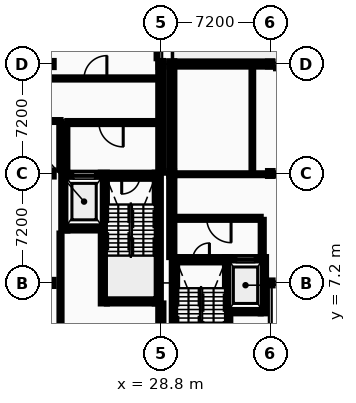
"""IFC4 building model, lengths in metres.
Left out: names, types, materials, properties, quantities, classifications, styles, units other than length and angle.
Written with IfcOpenShell. Run it as: python <this file> out.ifc"""

import sys

from ifc_helpers import new_model, si_unit, direction, frame, frame_2d, origin, origin_2d, place, context, subcontext, project, spatial, rectangle, i_section, extrude, element, fill, save


model = new_model("IFC4")
c1 = context("Model", 3, precision=1e-05, world=origin(), true_north=direction((0.0, 1.0)))
c2 = subcontext(c1, "Body", "Model", "MODEL_VIEW")
j1 = project(units=[si_unit("LENGTHUNIT", "METRE"), si_unit("PLANEANGLEUNIT", "RADIAN")], contexts=[c1])
p1 = place(None, origin())
s1 = spatial("IfcSite", under=j1, at=p1, CompositionType="ELEMENT")
p2 = place(p1, origin())
s2 = spatial("IfcBuilding", under=s1, at=p2, CompositionType="ELEMENT")
p3 = place(p2, frame((0.0, 0.0, 14.0)))
s3 = spatial("IfcBuildingStorey", under=s2, at=p3, CompositionType="ELEMENT", Elevation=14.0)
for number, where, z_axis, x_axis in (
    (1, (21.6, 7.2, 0.0), (0.0, 0.0, 1.0), (1.0, 0.0, 0.0)),
    (2, (21.6, 14.4, 0.0), (0.0, 0.0, 1.0), (1.0, 0.0, 0.0)),
    (3, (21.6, 21.6, 0.0), (0.0, 0.0, 1.0), (1.0, 0.0, 0.0)),
    (4, (28.8, 21.6, 0.0), (0.0, 0.0, 1.0), (1.0, 0.0, 0.0)),
):
    element("IfcColumn", number, at=place(p3, frame(where, z_axis=z_axis, x_axis=x_axis)), inside=s3, PredefinedType="COLUMN", context=c2, shape_type="SweptSolid", body=[
        extrude(i_section(OverallWidth=0.3, OverallDepth=0.4, WebThickness=0.013, FlangeThickness=0.024, FilletRadius=0.027, at=origin_2d()), origin(), (0.0, 0.0, 1.0), 4.4),
    ])
for number, where, z_axis, x_axis in (
    (5, (29.52, 14.4, 0.0), (0.0, 0.0, 1.0), (1.0, 0.0, 0.0)),
    (6, (29.52, 21.6, 0.0), (0.0, 0.0, 1.0), (1.0, 0.0, 0.0)),
    (7, (36.0, 7.2, 0.0), (0.0, 0.0, 1.0), (1.0, 0.0, 0.0)),
    (8, (36.0, 14.4, 0.0), (0.0, 0.0, 1.0), (1.0, 0.0, 0.0)),
    (9, (36.0, 21.6, 0.0), (0.0, 0.0, 1.0), (1.0, 0.0, 0.0)),
):
    element("IfcColumn", number, at=place(p3, frame(where, z_axis=z_axis, x_axis=x_axis)), inside=s3, PredefinedType="COLUMN", context=c2, shape_type="SweptSolid", body=[
        extrude(i_section(OverallWidth=0.3, OverallDepth=0.32, WebThickness=0.011, FlangeThickness=0.021, FilletRadius=0.027, at=origin_2d()), origin(), (0.0, 0.0, 1.0), 4.4),
    ])
p4 = place(p3, frame((28.8, -0.17, 0.0), z_axis=(0.0, 0.0, 1.0), x_axis=(0.0, 1.0, 0.0)))
e10 = element("IfcWall", 10, at=p4, inside=s3, PredefinedType="STANDARD", context=c2, shape_type="SweptSolid", body=[
    extrude(rectangle(XDim=6.02, YDim=0.34, at=frame_2d((3.01, 0.0))), origin(), (0.0, 0.0, 1.0), 4.2),
])
p5 = place(p4, frame((2.478, 0.0, 0.95)))
e11 = element("IfcOpeningElement", 11, at=p5, cuts=e10, PredefinedType="OPENING", context=c2, shape_type="SweptSolid", body=[
    extrude(rectangle(XDim=1.064, YDim=1.368, at=frame_2d((0.532, 0.684))), frame((0.0, 0.18, 0.0), z_axis=(0.0, -1.0, 0.0), x_axis=(1.0, 0.0, 0.0)), (0.0, 0.0, 1.0), 0.36),
])
p6 = place(p3, frame((28.8, 14.45, 0.0), z_axis=(0.0, 0.0, 1.0), x_axis=(0.0, 1.0, 0.0)))
e12 = element("IfcWall", 12, at=p6, inside=s3, PredefinedType="STANDARD", context=c2, shape_type="SweptSolid", body=[
    extrude(rectangle(XDim=7.15, YDim=0.34, at=frame_2d((3.575, 0.0))), origin(), (0.0, 0.0, 1.0), 4.2),
])
p7 = place(p6, frame((1.596, 0.0, 0.95)))
e13 = element("IfcOpeningElement", 13, at=p7, cuts=e12, PredefinedType="OPENING", context=c2, shape_type="SweptSolid", body=[
    extrude(rectangle(XDim=1.098, YDim=1.368, at=frame_2d((0.549, 0.684))), frame((0.0, 0.18, 0.0), z_axis=(0.0, -1.0, 0.0), x_axis=(1.0, 0.0, 0.0)), (0.0, 0.0, 1.0), 0.36),
])
p8 = place(p6, frame((4.456, 0.0, 0.95)))
e14 = element("IfcOpeningElement", 14, at=p8, cuts=e12, PredefinedType="OPENING", context=c2, shape_type="SweptSolid", body=[
    extrude(rectangle(XDim=1.098, YDim=1.368, at=frame_2d((0.549, 0.684))), frame((0.0, 0.18, 0.0), z_axis=(0.0, -1.0, 0.0), x_axis=(1.0, 0.0, 0.0)), (0.0, 0.0, 1.0), 0.36),
])
p9 = place(p3, frame((36.11, 21.6, 0.0), z_axis=(0.0, 0.0, 1.0), x_axis=(-1.0, 0.0, 0.0)))
e15 = element("IfcWall", 15, at=p9, inside=s3, PredefinedType="STANDARD", context=c2, shape_type="SweptSolid", body=[
    extrude(rectangle(XDim=6.42, YDim=0.34, at=frame_2d((3.21, 0.0))), origin(), (0.0, 0.0, 1.0), 3.935),
])
p10 = place(p3, frame((29.52, 14.4, 0.0), z_axis=(0.0, 0.0, 1.0), x_axis=(0.0, -1.0, 0.0)))
e16 = element("IfcWall", 16, at=p10, inside=s3, PredefinedType="STANDARD", context=c2, shape_type="SweptSolid", body=[
    extrude(rectangle(XDim=5.5, YDim=0.34, at=frame_2d((2.75, 0.0))), origin(), (0.0, 0.0, 1.0), 4.2),
])
p11 = place(p3, frame((29.52, 21.77, 0.0), z_axis=(0.0, 0.0, 1.0), x_axis=(0.0, -1.0, 0.0)))
e17 = element("IfcWall", 17, at=p11, inside=s3, PredefinedType="STANDARD", context=c2, shape_type="SweptSolid", body=[
    extrude(rectangle(XDim=7.37, YDim=0.34, at=frame_2d((3.685, 0.0))), origin(), (0.0, 0.0, 1.0), 3.895),
])
p12 = place(p11, frame((1.73, 0.0, 0.95)))
e18 = element("IfcOpeningElement", 18, at=p12, cuts=e17, PredefinedType="OPENING", context=c2, shape_type="SweptSolid", body=[
    extrude(rectangle(XDim=0.962, YDim=1.404, at=frame_2d((0.481, 0.702))), frame((0.0, 0.18, 0.0), z_axis=(0.0, -1.0, 0.0), x_axis=(1.0, 0.0, 0.0)), (0.0, 0.0, 1.0), 0.36),
])
p13 = place(p11, frame((4.678, 0.0, 0.95)))
e19 = element("IfcOpeningElement", 19, at=p13, cuts=e17, PredefinedType="OPENING", context=c2, shape_type="SweptSolid", body=[
    extrude(rectangle(XDim=0.962, YDim=1.404, at=frame_2d((0.481, 0.702))), frame((0.0, 0.18, 0.0), z_axis=(0.0, -1.0, 0.0), x_axis=(1.0, 0.0, 0.0)), (0.0, 0.0, 1.0), 0.36),
])
p14 = place(p3, frame((25.25, 6.05, 0.0), z_axis=(0.0, 0.0, 1.0), x_axis=(1.0, 0.0, 0.0)))
e20 = element("IfcWall", 20, at=p14, inside=s3, PredefinedType="SHEAR", context=c2, shape_type="SweptSolid", body=[
    extrude(rectangle(XDim=3.15, YDim=0.4, at=frame_2d((1.575, 0.0))), origin(), (0.0, 0.0, 1.0), 4.2),
])
p15 = place(p3, frame((25.25, 14.25, 0.0), z_axis=(0.0, 0.0, 1.0), x_axis=(1.0, 0.0, 0.0)))
e21 = element("IfcWall", 21, at=p15, inside=s3, PredefinedType="SHEAR", context=c2, shape_type="SweptSolid", body=[
    extrude(rectangle(XDim=3.15, YDim=0.4, at=frame_2d((1.575, 0.0))), origin(), (0.0, 0.0, 1.0), 4.2),
])
p16 = place(p15, frame((0.975, 0.0, 0.0)))
e22 = element("IfcOpeningElement", 22, at=p16, cuts=e21, PredefinedType="OPENING", context=c2, shape_type="SweptSolid", body=[
    extrude(rectangle(XDim=1.2, YDim=2.15, at=frame_2d((0.6, 1.075))), frame((0.0, 0.21, 0.0), z_axis=(0.0, -1.0, 0.0), x_axis=(1.0, 0.0, 0.0)), (0.0, 0.0, 1.0), 0.42),
])
for number, where, z_axis, x_axis in (
    (23, (25.05, 5.85, 0.0), (0.0, 0.0, 1.0), (0.0, 1.0, 0.0)),
    (24, (28.6, 5.85, 0.0), (0.0, 0.0, 1.0), (0.0, 1.0, 0.0)),
):
    element("IfcWall", number, at=place(p3, frame(where, z_axis=z_axis, x_axis=x_axis)), inside=s3, PredefinedType="SHEAR", context=c2, shape_type="SweptSolid", body=[
        extrude(rectangle(XDim=8.6, YDim=0.4, at=frame_2d((4.3, 0.0))), origin(), (0.0, 0.0, 1.0), 4.2),
    ])
p17 = place(p3, frame((22.65, 10.85, 0.0), z_axis=(0.0, 0.0, 1.0), x_axis=(1.0, 0.0, 0.0)))
e25 = element("IfcWall", 25, at=p17, inside=s3, PredefinedType="SHEAR", context=c2, shape_type="SweptSolid", body=[
    extrude(rectangle(XDim=2.2, YDim=0.4, at=frame_2d((1.1, 0.0))), origin(), (0.0, 0.0, 1.0), 4.2),
])
p18 = place(p3, frame((22.65, 14.25, 0.0), z_axis=(0.0, 0.0, 1.0), x_axis=(1.0, 0.0, 0.0)))
e26 = element("IfcWall", 26, at=p18, inside=s3, PredefinedType="SHEAR", context=c2, shape_type="SweptSolid", body=[
    extrude(rectangle(XDim=2.2, YDim=0.4, at=frame_2d((1.1, 0.0))), origin(), (0.0, 0.0, 1.0), 4.2),
])
p19 = place(p18, frame((0.4, 0.0, 0.0)))
e27 = element("IfcOpeningElement", 27, at=p19, cuts=e26, PredefinedType="OPENING", context=c2, shape_type="SweptSolid", body=[
    extrude(rectangle(XDim=1.4, YDim=2.2, at=frame_2d((0.7, 1.1))), frame((0.0, 0.21, 0.0), z_axis=(0.0, -1.0, 0.0), x_axis=(1.0, 0.0, 0.0)), (0.0, 0.0, 1.0), 0.42),
])
p20 = place(p3, frame((22.45, 10.65, 0.0), z_axis=(0.0, 0.0, 1.0), x_axis=(0.0, 1.0, 0.0)))
e28 = element("IfcWall", 28, at=p20, inside=s3, PredefinedType="SHEAR", context=c2, shape_type="SweptSolid", body=[
    extrude(rectangle(XDim=3.8, YDim=0.4, at=frame_2d((1.9, 0.0))), origin(), (0.0, 0.0, 1.0), 4.2),
])
p21 = place(p3, frame((22.65, 17.75, 0.0), z_axis=(0.0, 0.0, 1.0), x_axis=(1.0, 0.0, 0.0)))
e29 = element("IfcWall", 29, at=p21, inside=s3, PredefinedType="PARTITIONING", context=c2, shape_type="SweptSolid", body=[
    extrude(rectangle(XDim=5.75, YDim=0.2, at=frame_2d((2.875, 0.0))), origin(), (0.0, 0.0, 1.0), 4.2),
])
p22 = place(p21, frame((2.075, 0.0, 0.0)))
e30 = element("IfcOpeningElement", 30, at=p22, cuts=e29, PredefinedType="OPENING", context=c2, shape_type="SweptSolid", body=[
    extrude(rectangle(XDim=1.6, YDim=2.2, at=frame_2d((0.8, 1.1))), frame((0.0, 0.11, 0.0), z_axis=(0.0, -1.0, 0.0), x_axis=(1.0, 0.0, 0.0)), (0.0, 0.0, 1.0), 0.22),
])
p23 = place(p3, frame((22.55, 14.45, 0.0), z_axis=(0.0, 0.0, 1.0), x_axis=(0.0, 1.0, 0.0)))
e31 = element("IfcWall", 31, at=p23, inside=s3, PredefinedType="PARTITIONING", context=c2, shape_type="SweptSolid", body=[
    extrude(rectangle(XDim=3.2, YDim=0.2, at=frame_2d((1.6, 0.0))), origin(), (0.0, 0.0, 1.0), 4.2),
])
p24 = place(p3, frame((29.87, 8.725, 0.0), z_axis=(0.0, 0.0, 1.0), x_axis=(1.0, 0.0, 0.0)))
e32 = element("IfcWall", 32, at=p24, inside=s3, PredefinedType="SHEAR", context=c2, shape_type="SweptSolid", body=[
    extrude(rectangle(XDim=3.15, YDim=0.35, at=frame_2d((1.575, 0.0))), origin(), (0.0, 0.0, 1.0), 4.2),
])
p25 = place(p24, frame((1.025, 0.0, 0.0)))
e33 = element("IfcOpeningElement", 33, at=p25, cuts=e32, PredefinedType="OPENING", context=c2, shape_type="SweptSolid", body=[
    extrude(rectangle(XDim=1.1, YDim=2.15, at=frame_2d((0.55, 1.075))), frame((0.0, 0.185, 0.0), z_axis=(0.0, -1.0, 0.0), x_axis=(1.0, 0.0, 0.0)), (0.0, 0.0, 1.0), 0.37),
])
for number, where, z_axis, x_axis in (
    (34, (29.695, 0.4, 0.0), (0.0, 0.0, 1.0), (0.0, 1.0, 0.0)),
    (35, (33.195, 0.4, 0.0), (0.0, 0.0, 1.0), (0.0, 1.0, 0.0)),
):
    element("IfcWall", number, at=place(p3, frame(where, z_axis=z_axis, x_axis=x_axis)), inside=s3, PredefinedType="SHEAR", context=c2, shape_type="SweptSolid", body=[
        extrude(rectangle(XDim=8.5, YDim=0.35, at=frame_2d((4.25, 0.0))), origin(), (0.0, 0.0, 1.0), 4.2),
    ])
p26 = place(p3, frame((33.37, 5.375, 0.0), z_axis=(0.0, 0.0, 1.0), x_axis=(1.0, 0.0, 0.0)))
e36 = element("IfcWall", 36, at=p26, inside=s3, PredefinedType="SHEAR", context=c2, shape_type="SweptSolid", body=[
    extrude(rectangle(XDim=2.0, YDim=0.35, at=frame_2d((1.0, 0.0))), origin(), (0.0, 0.0, 1.0), 4.2),
])
p27 = place(p3, frame((33.37, 8.725, 0.0), z_axis=(0.0, 0.0, 1.0), x_axis=(1.0, 0.0, 0.0)))
e37 = element("IfcWall", 37, at=p27, inside=s3, PredefinedType="SHEAR", context=c2, shape_type="SweptSolid", body=[
    extrude(rectangle(XDim=2.0, YDim=0.35, at=frame_2d((1.0, 0.0))), origin(), (0.0, 0.0, 1.0), 4.2),
])
p28 = place(p27, frame((0.4, 0.0, 0.0)))
e38 = element("IfcOpeningElement", 38, at=p28, cuts=e37, PredefinedType="OPENING", context=c2, shape_type="SweptSolid", body=[
    extrude(rectangle(XDim=1.2, YDim=2.2, at=frame_2d((0.6, 1.1))), frame((0.0, 0.185, 0.0), z_axis=(0.0, -1.0, 0.0), x_axis=(1.0, 0.0, 0.0)), (0.0, 0.0, 1.0), 0.37),
])
p29 = place(p3, frame((35.545, 5.2, 0.0), z_axis=(0.0, 0.0, 1.0), x_axis=(0.0, 1.0, 0.0)))
e39 = element("IfcWall", 39, at=p29, inside=s3, PredefinedType="SHEAR", context=c2, shape_type="SweptSolid", body=[
    extrude(rectangle(XDim=3.7, YDim=0.35, at=frame_2d((1.85, 0.0))), origin(), (0.0, 0.0, 1.0), 4.2),
])
p30 = place(p3, frame((29.87, 11.45, 0.0), z_axis=(0.0, 0.0, 1.0), x_axis=(1.0, 0.0, 0.0)))
e40 = element("IfcWall", 40, at=p30, inside=s3, PredefinedType="PARTITIONING", context=c2, shape_type="SweptSolid", body=[
    extrude(rectangle(XDim=5.5, YDim=0.2, at=frame_2d((2.75, 0.0))), origin(), (0.0, 0.0, 1.0), 4.2),
])
p31 = place(p30, frame((1.95, 0.0, 0.0)))
e41 = element("IfcOpeningElement", 41, at=p31, cuts=e40, PredefinedType="OPENING", context=c2, shape_type="SweptSolid", body=[
    extrude(rectangle(XDim=1.6, YDim=2.2, at=frame_2d((0.8, 1.1))), frame((0.0, 0.11, 0.0), z_axis=(0.0, -1.0, 0.0), x_axis=(1.0, 0.0, 0.0)), (0.0, 0.0, 1.0), 0.22),
])
p32 = place(p3, frame((35.47, 8.9, 0.0), z_axis=(0.0, 0.0, 1.0), x_axis=(0.0, 1.0, 0.0)))
e42 = element("IfcWall", 42, at=p32, inside=s3, PredefinedType="PARTITIONING", context=c2, shape_type="SweptSolid", body=[
    extrude(rectangle(XDim=2.45, YDim=0.2, at=frame_2d((1.225, 0.0))), origin(), (0.0, 0.0, 1.0), 4.2),
])
p33 = place(p3, frame((29.9, 14.35, 0.0), z_axis=(0.0, 0.0, 1.0), x_axis=(1.0, 0.0, 0.0)))
e43 = element("IfcWall", 43, at=p33, inside=s3, PredefinedType="PARTITIONING", context=c2, shape_type="SweptSolid", body=[
    extrude(rectangle(XDim=5.72, YDim=0.125, at=frame_2d((2.86, 0.0))), origin(), (0.0, 0.0, 1.0), 3.935),
])
p34 = place(p33, frame((1.96, 0.0, 0.0)))
e44 = element("IfcOpeningElement", 44, at=p34, cuts=e43, PredefinedType="OPENING", context=c2, shape_type="SweptSolid", body=[
    extrude(rectangle(XDim=1.0, YDim=2.1, at=frame_2d((0.5, 1.05))), frame((0.0, 0.073, 0.0), z_axis=(0.0, -1.0, 0.0), x_axis=(1.0, 0.0, 0.0)), (0.0, 0.0, 1.0), 0.145),
])
p35 = place(p3, frame((9.45, 17.85, 0.0), z_axis=(0.0, 0.0, 1.0), x_axis=(1.0, 0.0, 0.0)))
e45 = element("IfcWall", 45, at=p35, inside=s3, PredefinedType="PARTITIONING", context=c2, shape_type="SweptSolid", body=[
    extrude(rectangle(XDim=12.75, YDim=0.125, at=frame_2d((6.375, 0.0))), origin(), (0.0, 0.0, 1.0), 4.2),
])
p36 = place(p35, frame((1.225, 0.0, 0.0)))
e46 = element("IfcOpeningElement", 46, at=p36, cuts=e45, PredefinedType="OPENING", context=c2, shape_type="SweptSolid", body=[
    extrude(rectangle(XDim=1.0, YDim=2.1, at=frame_2d((0.5, 1.05))), frame((0.0, 0.073, 0.0), z_axis=(0.0, -1.0, 0.0), x_axis=(1.0, 0.0, 0.0)), (0.0, 0.0, 1.0), 0.145),
])
p37 = place(p35, frame((6.25, 0.0, 0.0)))
e47 = element("IfcOpeningElement", 47, at=p37, cuts=e45, PredefinedType="OPENING", context=c2, shape_type="SweptSolid", body=[
    extrude(rectangle(XDim=0.9, YDim=2.1, at=frame_2d((0.45, 1.05))), frame((0.0, 0.073, 0.0), z_axis=(0.0, -1.0, 0.0), x_axis=(1.0, 0.0, 0.0)), (0.0, 0.0, 1.0), 0.145),
])
p38 = place(p35, frame((8.05, 0.0, 0.0)))
e48 = element("IfcOpeningElement", 48, at=p38, cuts=e45, PredefinedType="OPENING", context=c2, shape_type="SweptSolid", body=[
    extrude(rectangle(XDim=0.906, YDim=2.04, at=frame_2d((0.453, 1.02))), frame((0.0, 0.073, 0.0), z_axis=(0.0, -1.0, 0.0), x_axis=(1.0, 0.0, 0.0)), (0.0, 0.0, 1.0), 0.145),
])
p39 = place(p3, frame((14.7, 20.65, 0.0), z_axis=(0.0, 0.0, 1.0), x_axis=(1.0, 0.0, 0.0)))
e49 = element("IfcWall", 49, at=p39, inside=s3, PredefinedType="PARTITIONING", context=c2, shape_type="SweptSolid", body=[
    extrude(rectangle(XDim=13.9, YDim=0.142, at=frame_2d((6.95, 0.0))), origin(), (0.0, 0.0, 1.0), 4.2),
])
p40 = place(p39, frame((2.384, 0.0, 0.0)))
e50 = element("IfcOpeningElement", 50, at=p40, cuts=e49, PredefinedType="OPENING", context=c2, shape_type="SweptSolid", body=[
    extrude(rectangle(XDim=0.932, YDim=2.04, at=frame_2d((0.466, 1.02))), frame((0.0, 0.081, 0.0), z_axis=(0.0, -1.0, 0.0), x_axis=(1.0, 0.0, 0.0)), (0.0, 0.0, 1.0), 0.162),
])
p41 = place(p39, frame((9.05, 0.0, 0.0)))
e51 = element("IfcOpeningElement", 51, at=p41, cuts=e49, PredefinedType="OPENING", context=c2, shape_type="SweptSolid", body=[
    extrude(rectangle(XDim=1.5, YDim=2.2, at=frame_2d((0.75, 1.1))), frame((0.0, 0.081, 0.0), z_axis=(0.0, -1.0, 0.0), x_axis=(1.0, 0.0, 0.0)), (0.0, 0.0, 1.0), 0.162),
])
p42 = place(p3, frame((22.2, 0.2, 0.0), z_axis=(0.0, 0.0, 1.0), x_axis=(0.0, 1.0, 0.0)))
e52 = element("IfcWall", 52, at=p42, inside=s3, PredefinedType="PARTITIONING", context=c2, shape_type="SweptSolid", body=[
    extrude(rectangle(XDim=10.25, YDim=0.135, at=frame_2d((5.125, 0.0))), origin(), (0.0, 0.0, 1.0), 4.2),
])
p43 = place(p3, frame((22.2, 14.65, 0.0), z_axis=(0.0, 0.0, 1.0), x_axis=(0.0, 1.0, 0.0)))
e53 = element("IfcWall", 53, at=p43, inside=s3, PredefinedType="PARTITIONING", context=c2, shape_type="SweptSolid", body=[
    extrude(rectangle(XDim=3.138, YDim=0.16, at=frame_2d((1.569, 0.0))), origin(), (0.0, 0.0, 1.0), 4.2),
])
p44 = place(p3, frame((28.6, 21.98, 0.0), z_axis=(0.0, 0.0, 1.0), x_axis=(0.0, 1.0, 0.0)))
e54 = element("IfcWall", 54, at=p44, inside=s3, PredefinedType="PARTITIONING", context=c2, shape_type="SweptSolid", body=[
    extrude(rectangle(XDim=6.44, YDim=0.158, at=frame_2d((3.22, 0.0))), origin(), (0.0, 0.0, 1.0), 3.885),
])
p45 = place(p3, frame((34.82, 14.413, 0.0), z_axis=(0.0, 0.0, 1.0), x_axis=(0.0, 1.0, 0.0)))
e55 = element("IfcWall", 55, at=p45, inside=s3, PredefinedType="PARTITIONING", context=c2, shape_type="SweptSolid", body=[
    extrude(rectangle(XDim=6.987, YDim=0.11, at=frame_2d((3.494, 0.0))), origin(), (0.0, 0.0, 1.0), 4.2),
])
p46 = place(p7, origin())
e56 = element("IfcWindow", 56, at=p46, inside=s3, PartitioningType="SINGLE_PANEL", PredefinedType="WINDOW", context=c2, shape_type="SweptSolid", body=[
    extrude(rectangle(XDim=1.098, YDim=1.368, at=frame_2d((0.549, 0.684))), frame((0.0, 0.03, 0.0), z_axis=(0.0, -1.0, 0.0), x_axis=(1.0, 0.0, 0.0)), (0.0, 0.0, 1.0), 0.06),
])
fill(e13, e56)
p47 = place(p8, origin())
e57 = element("IfcWindow", 57, at=p47, inside=s3, PartitioningType="SINGLE_PANEL", PredefinedType="WINDOW", context=c2, shape_type="SweptSolid", body=[
    extrude(rectangle(XDim=1.098, YDim=1.368, at=frame_2d((0.549, 0.684))), frame((0.0, 0.03, 0.0), z_axis=(0.0, -1.0, 0.0), x_axis=(1.0, 0.0, 0.0)), (0.0, 0.0, 1.0), 0.06),
])
fill(e14, e57)
p48 = place(p12, origin())
e58 = element("IfcWindow", 58, at=p48, inside=s3, PartitioningType="SINGLE_PANEL", PredefinedType="WINDOW", context=c2, shape_type="SweptSolid", body=[
    extrude(rectangle(XDim=0.962, YDim=1.404, at=frame_2d((0.481, 0.702))), frame((0.0, 0.03, 0.0), z_axis=(0.0, -1.0, 0.0), x_axis=(1.0, 0.0, 0.0)), (0.0, 0.0, 1.0), 0.06),
])
fill(e18, e58)
p49 = place(p13, origin())
e59 = element("IfcWindow", 59, at=p49, inside=s3, PartitioningType="SINGLE_PANEL", PredefinedType="WINDOW", context=c2, shape_type="SweptSolid", body=[
    extrude(rectangle(XDim=0.962, YDim=1.404, at=frame_2d((0.481, 0.702))), frame((0.0, 0.03, 0.0), z_axis=(0.0, -1.0, 0.0), x_axis=(1.0, 0.0, 0.0)), (0.0, 0.0, 1.0), 0.06),
])
fill(e19, e59)
p50 = place(p16, frame((1.2, 0.0, 0.0), z_axis=(0.0, 0.0, 1.0), x_axis=(-1.0, 0.0, 0.0)))
e60 = element("IfcDoor", 60, at=p50, inside=s3, OperationType="SINGLE_SWING_LEFT", PredefinedType="DOOR", context=c2, shape_type="SweptSolid", body=[
    extrude(rectangle(XDim=1.2, YDim=2.15, at=frame_2d((0.6, 1.075))), frame((0.0, 0.025, 0.0), z_axis=(0.0, -1.0, 0.0), x_axis=(1.0, 0.0, 0.0)), (0.0, 0.0, 1.0), 0.05),
])
fill(e22, e60)
p51 = place(p19, origin())
e61 = element("IfcDoor", 61, at=p51, inside=s3, OperationType="SLIDING_TO_LEFT", PredefinedType="DOOR", context=c2, shape_type="SweptSolid", body=[
    extrude(rectangle(XDim=1.4, YDim=2.2, at=frame_2d((0.7, 1.1))), frame((0.0, 0.025, 0.0), z_axis=(0.0, -1.0, 0.0), x_axis=(1.0, 0.0, 0.0)), (0.0, 0.0, 1.0), 0.05),
])
fill(e27, e61)
p52 = place(p22, origin())
e62 = element("IfcDoor", 62, at=p52, inside=s3, OperationType="DOUBLE_DOOR_SINGLE_SWING", PredefinedType="DOOR", context=c2, shape_type="SweptSolid", body=[
    extrude(rectangle(XDim=1.6, YDim=2.2, at=frame_2d((0.8, 1.1))), frame((0.0, 0.025, 0.0), z_axis=(0.0, -1.0, 0.0), x_axis=(1.0, 0.0, 0.0)), (0.0, 0.0, 1.0), 0.05),
])
fill(e30, e62)
p53 = place(p25, frame((1.1, 0.0, 0.0), z_axis=(0.0, 0.0, 1.0), x_axis=(-1.0, 0.0, 0.0)))
e63 = element("IfcDoor", 63, at=p53, inside=s3, OperationType="SINGLE_SWING_RIGHT", PredefinedType="DOOR", context=c2, shape_type="SweptSolid", body=[
    extrude(rectangle(XDim=1.1, YDim=2.15, at=frame_2d((0.55, 1.075))), frame((0.0, 0.025, 0.0), z_axis=(0.0, -1.0, 0.0), x_axis=(1.0, 0.0, 0.0)), (0.0, 0.0, 1.0), 0.05),
])
fill(e33, e63)
p54 = place(p28, origin())
e64 = element("IfcDoor", 64, at=p54, inside=s3, OperationType="SLIDING_TO_RIGHT", PredefinedType="DOOR", context=c2, shape_type="SweptSolid", body=[
    extrude(rectangle(XDim=1.2, YDim=2.2, at=frame_2d((0.6, 1.1))), frame((0.0, 0.025, 0.0), z_axis=(0.0, -1.0, 0.0), x_axis=(1.0, 0.0, 0.0)), (0.0, 0.0, 1.0), 0.05),
])
fill(e38, e64)
p55 = place(p31, origin())
e65 = element("IfcDoor", 65, at=p55, inside=s3, OperationType="DOUBLE_DOOR_SINGLE_SWING", PredefinedType="DOOR", context=c2, shape_type="SweptSolid", body=[
    extrude(rectangle(XDim=1.6, YDim=2.2, at=frame_2d((0.8, 1.1))), frame((0.0, 0.025, 0.0), z_axis=(0.0, -1.0, 0.0), x_axis=(1.0, 0.0, 0.0)), (0.0, 0.0, 1.0), 0.05),
])
fill(e41, e65)
p56 = place(p41, frame((1.5, 0.0, 0.0), z_axis=(0.0, 0.0, 1.0), x_axis=(-1.0, 0.0, 0.0)))
e66 = element("IfcDoor", 66, at=p56, inside=s3, OperationType="DOUBLE_DOOR_SINGLE_SWING", PredefinedType="DOOR", context=c2, shape_type="SweptSolid", body=[
    extrude(rectangle(XDim=1.5, YDim=2.2, at=frame_2d((0.75, 1.1))), frame((0.0, 0.025, 0.0), z_axis=(0.0, -1.0, 0.0), x_axis=(1.0, 0.0, 0.0)), (0.0, 0.0, 1.0), 0.05),
])
fill(e51, e66)
p57 = place(p34, frame((1.0, 0.0, 0.0), z_axis=(0.0, 0.0, 1.0), x_axis=(-1.0, 0.0, 0.0)))
e67 = element("IfcDoor", 67, at=p57, inside=s3, OperationType="SLIDING_TO_LEFT", PredefinedType="DOOR", context=c2, shape_type="SweptSolid", body=[
    extrude(rectangle(XDim=1.0, YDim=2.1, at=frame_2d((0.5, 1.05))), frame((0.0, 0.025, 0.0), z_axis=(0.0, -1.0, 0.0), x_axis=(1.0, 0.0, 0.0)), (0.0, 0.0, 1.0), 0.05),
])
fill(e44, e67)
save(model, sys.argv[1])
